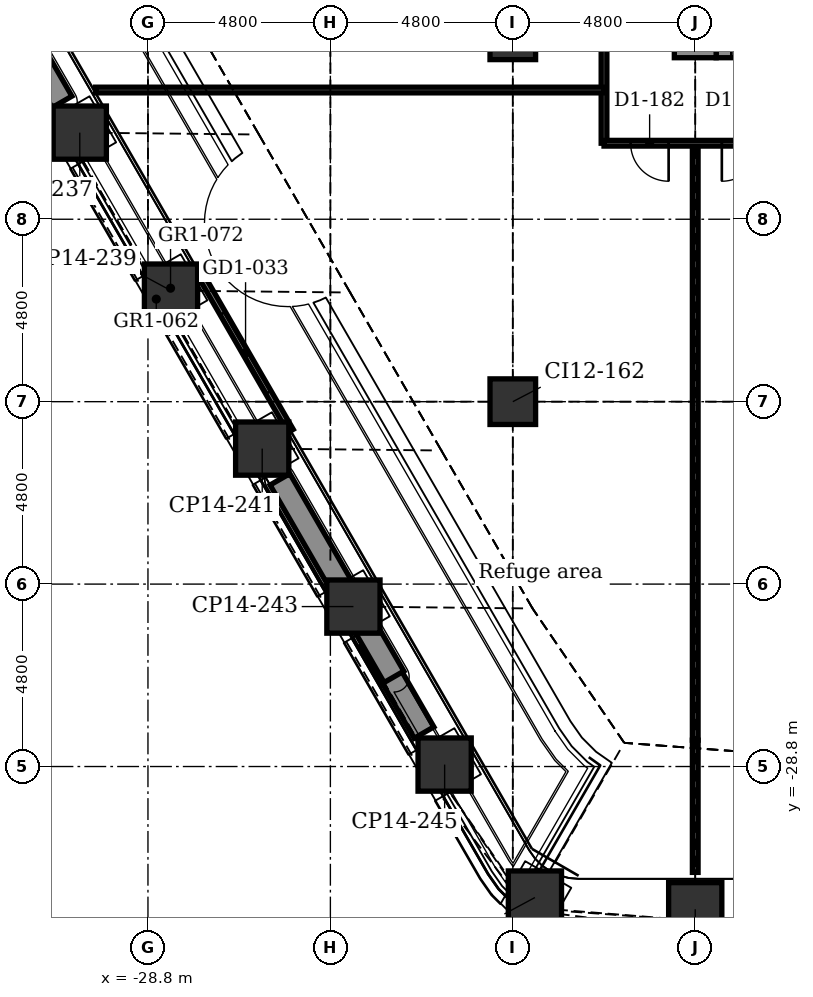
"""IFC4 building model, lengths in metres.
Left out: names, types, materials, properties, quantities, classifications, styles, units other than length and angle.
Written with IfcOpenShell. Run it as: python <this file> out.ifc"""

import sys

from ifc_helpers import new_model, si_unit, direction, frame, frame_2d, origin, origin_2d, place, context, subcontext, project, spatial, rectangle, extrude, element, fill, save


model = new_model("IFC4")
c1 = context("Model", 3, precision=1e-05, world=origin(), true_north=direction((0.0, 1.0)))
c2 = subcontext(c1, "Body", "Model", "MODEL_VIEW")
j1 = project(units=[si_unit("LENGTHUNIT", "METRE"), si_unit("PLANEANGLEUNIT", "RADIAN")], contexts=[c1])
p1 = place(None, origin())
s1 = spatial("IfcSite", under=j1, at=p1, CompositionType="ELEMENT")
p2 = place(p1, origin())
s2 = spatial("IfcBuilding", under=s1, at=p2, CompositionType="ELEMENT")
p3 = place(p2, frame((0.0, 0.0, 71.9)))
s3 = spatial("IfcBuildingStorey", under=s2, at=p3, CompositionType="ELEMENT", Elevation=71.9)
for number, where, z_axis, x_axis in (
    (1, (-14.4, -32.555, -0.3), (0.0, 0.0, 1.0), (1.0, 0.0, 0.0)),
    (2, (-18.618, -32.247, -0.3), (0.0, 0.0, 1.0), (0.5, 0.866, 0.0)),
    (3, (-20.994, -28.749, -0.3), (0.0, 0.0, 1.0), (0.866, 0.5, 0.0)),
    (4, (-23.394, -24.592, -0.3), (0.0, 0.0, 1.0), (0.866, 0.5, 0.0)),
    (5, (-25.794, -20.435, -0.3), (0.0, 0.0, 1.0), (0.866, 0.5, 0.0)),
    (6, (-28.194, -16.278, -0.3), (0.0, 0.0, 1.0), (0.866, 0.5, 0.0)),
    (7, (-30.594, -12.121, -0.3), (0.0, 0.0, 1.0), (0.866, 0.5, 0.0)),
):
    element("IfcColumn", number, at=place(p3, frame(where, z_axis=z_axis, x_axis=x_axis)), inside=s3, PredefinedType="COLUMN", context=c2, shape_type="SweptSolid", body=[
        extrude(rectangle(XDim=1.4, YDim=1.4, at=origin_2d()), origin(), (0.0, 0.0, 1.0), 6.1),
    ])
for number, where, z_axis, x_axis in (
    (8, (-19.2, -19.2, -0.3), (0.0, 0.0, 1.0), (1.0, 0.0, 0.0)),
    (9, (-19.2, -9.6, -0.3), (0.0, 0.0, 1.0), (1.0, 0.0, 0.0)),
):
    element("IfcColumn", number, at=place(p3, frame(where, z_axis=z_axis, x_axis=x_axis)), inside=s3, PredefinedType="COLUMN", context=c2, shape_type="SweptSolid", body=[
        extrude(rectangle(XDim=1.2, YDim=1.2, at=origin_2d()), origin(), (0.0, 0.0, 1.0), 6.1),
    ])
p4 = place(p3, frame((-13.85, -9.6, -0.3), z_axis=(0.0, 0.0, 1.0), x_axis=(1.0, 0.0, 0.0)))
e10 = element("IfcWall", 10, at=p4, inside=s3, PredefinedType="SHEAR", context=c2, shape_type="SweptSolid", body=[
    extrude(rectangle(XDim=3.7, YDim=1.1, at=frame_2d((1.85, 0.0))), origin(), (0.0, 0.0, 1.0), 6.1),
])
p5 = place(p4, frame((0.4, 0.0, 0.3)))
e11 = element("IfcOpeningElement", 11, at=p5, cuts=e10, PredefinedType="OPENING", context=c2, shape_type="SweptSolid", body=[
    extrude(rectangle(XDim=0.9, YDim=2.1, at=frame_2d((0.45, 1.05))), frame((0.0, 0.56, 0.0), z_axis=(0.0, -1.0, 0.0), x_axis=(1.0, 0.0, 0.0)), (0.0, 0.0, 1.0), 1.12),
])
p6 = place(p4, frame((2.75, 0.0, 0.3)))
e12 = element("IfcOpeningElement", 12, at=p6, cuts=e10, PredefinedType="OPENING", context=c2, shape_type="SweptSolid", body=[
    extrude(rectangle(XDim=0.9, YDim=2.1, at=frame_2d((0.45, 1.05))), frame((0.0, 0.56, 0.0), z_axis=(0.0, -1.0, 0.0), x_axis=(1.0, 0.0, 0.0)), (0.0, 0.0, 1.0), 1.12),
])
p7 = place(p3, frame((-14.4, -10.15, -0.3), z_axis=(0.0, 0.0, 1.0), x_axis=(0.0, 1.0, 0.0)))
e13 = element("IfcWall", 13, at=p7, inside=s3, PredefinedType="SHEAR", context=c2, shape_type="SweptSolid", body=[
    extrude(rectangle(XDim=20.3, YDim=1.1, at=frame_2d((10.15, 0.0))), origin(), (0.0, 0.0, 1.0), 6.1),
])
p8 = place(p7, frame((3.6, 0.0, 0.3)))
e14 = element("IfcOpeningElement", 14, at=p8, cuts=e13, PredefinedType="OPENING", context=c2, shape_type="SweptSolid", body=[
    extrude(rectangle(XDim=1.1, YDim=2.1, at=frame_2d((0.55, 1.05))), frame((0.0, 0.56, 0.0), z_axis=(0.0, -1.0, 0.0), x_axis=(1.0, 0.0, 0.0)), (0.0, 0.0, 1.0), 1.12),
])
p9 = place(p7, frame((6.0, 0.0, 0.3)))
e15 = element("IfcOpeningElement", 15, at=p9, cuts=e13, PredefinedType="OPENING", context=c2, shape_type="SweptSolid", body=[
    extrude(rectangle(XDim=1.1, YDim=2.1, at=frame_2d((0.55, 1.05))), frame((0.0, 0.56, 0.0), z_axis=(0.0, -1.0, 0.0), x_axis=(1.0, 0.0, 0.0)), (0.0, 0.0, 1.0), 1.12),
])
p10 = place(p7, frame((8.4, 0.0, 0.3)))
e16 = element("IfcOpeningElement", 16, at=p10, cuts=e13, PredefinedType="OPENING", context=c2, shape_type="SweptSolid", body=[
    extrude(rectangle(XDim=1.1, YDim=2.1, at=frame_2d((0.55, 1.05))), frame((0.0, 0.56, 0.0), z_axis=(0.0, -1.0, 0.0), x_axis=(1.0, 0.0, 0.0)), (0.0, 0.0, 1.0), 1.12),
])
p11 = place(p7, frame((10.8, 0.0, 0.3)))
e17 = element("IfcOpeningElement", 17, at=p11, cuts=e13, PredefinedType="OPENING", context=c2, shape_type="SweptSolid", body=[
    extrude(rectangle(XDim=1.1, YDim=2.1, at=frame_2d((0.55, 1.05))), frame((0.0, 0.56, 0.0), z_axis=(0.0, -1.0, 0.0), x_axis=(1.0, 0.0, 0.0)), (0.0, 0.0, 1.0), 1.12),
])
p12 = place(p3, frame((-25.047, -19.969, 0.0), z_axis=(0.0, 0.0, 1.0), x_axis=(-0.5000167099, 0.866015756104, 0.0)))
e18 = element("IfcWall", 18, at=p12, inside=s3, PredefinedType="PARTITIONING", context=c2, shape_type="SweptSolid", body=[
    extrude(rectangle(XDim=4.74, YDim=0.16, at=frame_2d((2.37, 0.0))), origin(), (0.0, 0.0, 1.0), 5.7),
])
p13 = place(p12, frame((1.17, 0.0, 0.0)))
e19 = element("IfcOpeningElement", 19, at=p13, cuts=e18, PredefinedType="OPENING", context=c2, shape_type="SweptSolid", body=[
    extrude(rectangle(XDim=2.4, YDim=2.4, at=frame_2d((1.2, 1.2))), frame((0.0, 0.09, 0.0), z_axis=(0.0, -1.0, 0.0), x_axis=(1.0, 0.0, 0.0)), (0.0, 0.0, 1.0), 0.18),
])
p14 = place(p3, frame((-21.537, -27.907, 0.0), z_axis=(0.0, 0.0, 1.0), x_axis=(-0.49998411664, 0.866034573852, 0.0)))
e20 = element("IfcWall", 20, at=p14, inside=s3, PredefinedType="USERDEFINED", context=c2, shape_type="SweptSolid", body=[
    extrude(rectangle(XDim=2.8, YDim=0.6, at=frame_2d((1.4, 0.0))), origin(), (0.0, 0.0, 1.0), 0.7),
])
for number, where, z_axis, x_axis in (
    (21, (-22.327, -26.44, 6.0), (0.0, 0.0, 1.0), (-0.5, 0.866, 0.0)),
    (22, (-31.061, -11.312, 6.0), (0.0, 0.0, 1.0), (-0.5, 0.866, 0.0)),
):
    element("IfcWall", number, at=place(p3, frame(where, z_axis=z_axis, x_axis=x_axis)), inside=s3, PredefinedType="USERDEFINED", context=c2, shape_type="SweptSolid", body=[
        extrude(rectangle(XDim=6.0, YDim=0.6, at=frame_2d((3.0, 0.0))), origin(), (0.0, 0.0, 1.0), 0.7),
    ])
p15 = place(p3, frame((-14.4, -28.107, 0.0), z_axis=(0.0, 0.0, 1.0), x_axis=(0.0, 1.0, 0.0)))
e23 = element("IfcWall", 23, at=p15, inside=s3, PredefinedType="PARTITIONING", context=c2, shape_type="SweptSolid", body=[
    extrude(rectangle(XDim=15.707, YDim=0.15, at=frame_2d((7.854, 0.0))), origin(), (0.0, 0.0, 1.0), 5.343),
])
p16 = place(p3, frame((-14.4, -31.585, 0.0), z_axis=(0.0, 0.0, 1.0), x_axis=(0.0, 1.0, 0.0)))
e24 = element("IfcWall", 24, at=p16, inside=s3, PredefinedType="PARTITIONING", context=c2, shape_type="SweptSolid", body=[
    extrude(rectangle(XDim=3.479, YDim=0.15, at=frame_2d((1.739, 0.0))), origin(), (0.0, 0.0, 1.0), 5.8),
])
p17 = place(p3, frame((-16.8, -12.4, 0.0), z_axis=(0.0, 0.0, 1.0), x_axis=(0.0, 1.0, 0.0)))
e25 = element("IfcWall", 25, at=p17, inside=s3, PredefinedType="PARTITIONING", context=c2, shape_type="SweptSolid", body=[
    extrude(rectangle(XDim=8.45, YDim=0.15, at=frame_2d((4.225, 0.0))), origin(), (0.0, 0.0, 1.0), 5.8),
])
p18 = place(p17, frame((5.2, 0.0, 0.0)))
e26 = element("IfcOpeningElement", 26, at=p18, cuts=e25, PredefinedType="OPENING", context=c2, shape_type="SweptSolid", body=[
    extrude(rectangle(XDim=1.0, YDim=2.1, at=frame_2d((0.5, 1.05))), frame((0.0, 0.085, 0.0), z_axis=(0.0, -1.0, 0.0), x_axis=(1.0, 0.0, 0.0)), (0.0, 0.0, 1.0), 0.17),
])
p19 = place(p3, frame((-16.8, -12.4, 0.0), z_axis=(0.0, 0.0, 1.0), x_axis=(1.0, 0.0, 0.0)))
e27 = element("IfcWall", 27, at=p19, inside=s3, PredefinedType="PARTITIONING", context=c2, shape_type="SweptSolid", body=[
    extrude(rectangle(XDim=38.4, YDim=0.15, at=frame_2d((19.2, 0.0))), origin(), (0.0, 0.0, 1.0), 5.8),
])
p20 = place(p19, frame((0.7, 0.0, 0.0)))
e28 = element("IfcOpeningElement", 28, at=p20, cuts=e27, PredefinedType="OPENING", context=c2, shape_type="SweptSolid", body=[
    extrude(rectangle(XDim=1.0, YDim=2.1, at=frame_2d((0.5, 1.05))), frame((0.0, 0.085, 0.0), z_axis=(0.0, -1.0, 0.0), x_axis=(1.0, 0.0, 0.0)), (0.0, 0.0, 1.0), 0.17),
])
p21 = place(p19, frame((3.1, 0.0, 0.0)))
e29 = element("IfcOpeningElement", 29, at=p21, cuts=e27, PredefinedType="OPENING", context=c2, shape_type="SweptSolid", body=[
    extrude(rectangle(XDim=1.0, YDim=2.1, at=frame_2d((0.5, 1.05))), frame((0.0, 0.085, 0.0), z_axis=(0.0, -1.0, 0.0), x_axis=(1.0, 0.0, 0.0)), (0.0, 0.0, 1.0), 0.17),
])
p22 = place(p19, frame((5.5, 0.0, 0.0)))
e30 = element("IfcOpeningElement", 30, at=p22, cuts=e27, PredefinedType="OPENING", context=c2, shape_type="SweptSolid", body=[
    extrude(rectangle(XDim=1.0, YDim=2.1, at=frame_2d((0.5, 1.05))), frame((0.0, 0.085, 0.0), z_axis=(0.0, -1.0, 0.0), x_axis=(1.0, 0.0, 0.0)), (0.0, 0.0, 1.0), 0.17),
])
p23 = place(p19, frame((11.095, 0.0, 0.0)))
e31 = element("IfcOpeningElement", 31, at=p23, cuts=e27, PredefinedType="OPENING", context=c2, shape_type="SweptSolid", body=[
    extrude(rectangle(XDim=1.0, YDim=2.1, at=frame_2d((0.5, 1.05))), frame((0.0, 0.085, 0.0), z_axis=(0.0, -1.0, 0.0), x_axis=(1.0, 0.0, 0.0)), (0.0, 0.0, 1.0), 0.17),
])
p24 = place(p19, frame((15.275, 0.0, 0.0)))
e32 = element("IfcOpeningElement", 32, at=p24, cuts=e27, PredefinedType="OPENING", context=c2, shape_type="SweptSolid", body=[
    extrude(rectangle(XDim=1.0, YDim=2.1, at=frame_2d((0.5, 1.05))), frame((0.0, 0.085, 0.0), z_axis=(0.0, -1.0, 0.0), x_axis=(1.0, 0.0, 0.0)), (0.0, 0.0, 1.0), 0.17),
])
p25 = place(p19, frame((23.5, 0.0, 0.0)))
e33 = element("IfcOpeningElement", 33, at=p25, cuts=e27, PredefinedType="OPENING", context=c2, shape_type="SweptSolid", body=[
    extrude(rectangle(XDim=1.0, YDim=2.1, at=frame_2d((0.5, 1.05))), frame((0.0, 0.085, 0.0), z_axis=(0.0, -1.0, 0.0), x_axis=(1.0, 0.0, 0.0)), (0.0, 0.0, 1.0), 0.17),
])
p26 = place(p19, frame((27.1, 0.0, 0.0)))
e34 = element("IfcOpeningElement", 34, at=p26, cuts=e27, PredefinedType="OPENING", context=c2, shape_type="SweptSolid", body=[
    extrude(rectangle(XDim=1.0, YDim=2.1, at=frame_2d((0.5, 1.05))), frame((0.0, 0.085, 0.0), z_axis=(0.0, -1.0, 0.0), x_axis=(1.0, 0.0, 0.0)), (0.0, 0.0, 1.0), 0.17),
])
p27 = place(p19, frame((29.5, 0.0, 0.0)))
e35 = element("IfcOpeningElement", 35, at=p27, cuts=e27, PredefinedType="OPENING", context=c2, shape_type="SweptSolid", body=[
    extrude(rectangle(XDim=1.0, YDim=2.1, at=frame_2d((0.5, 1.05))), frame((0.0, 0.085, 0.0), z_axis=(0.0, -1.0, 0.0), x_axis=(1.0, 0.0, 0.0)), (0.0, 0.0, 1.0), 0.17),
])
p28 = place(p19, frame((31.9, 0.0, 0.0)))
e36 = element("IfcOpeningElement", 36, at=p28, cuts=e27, PredefinedType="OPENING", context=c2, shape_type="SweptSolid", body=[
    extrude(rectangle(XDim=1.0, YDim=2.1, at=frame_2d((0.5, 1.05))), frame((0.0, 0.085, 0.0), z_axis=(0.0, -1.0, 0.0), x_axis=(1.0, 0.0, 0.0)), (0.0, 0.0, 1.0), 0.17),
])
p29 = place(p3, frame((-30.178, -11.0, 0.0), z_axis=(0.0, 0.0, 1.0), x_axis=(1.0, 0.0, 0.0)))
e37 = element("IfcWall", 37, at=p29, inside=s3, PredefinedType="PARTITIONING", context=c2, shape_type="SweptSolid", body=[
    extrude(rectangle(XDim=13.378, YDim=0.15, at=frame_2d((6.689, 0.0))), origin(), (0.0, 0.0, 1.0), 5.7),
])
p30 = place(p13, origin())
e38 = element("IfcDoor", 38, at=p30, inside=s3, OperationType="DOUBLE_DOOR_SLIDING", PredefinedType="DOOR", context=c2, shape_type="SweptSolid", body=[
    extrude(rectangle(XDim=2.4, YDim=2.4, at=frame_2d((1.2, 1.2))), frame((0.0, 0.025, 0.0), z_axis=(0.0, -1.0, 0.0), x_axis=(1.0, 0.0, 0.0)), (0.0, 0.0, 1.0), 0.05),
])
fill(e19, e38)
p31 = place(p20, frame((1.0, 0.0, 0.0), z_axis=(0.0, 0.0, 1.0), x_axis=(-1.0, 0.0, 0.0)))
e39 = element("IfcDoor", 39, at=p31, inside=s3, OperationType="SINGLE_SWING_RIGHT", PredefinedType="DOOR", context=c2, shape_type="SweptSolid", body=[
    extrude(rectangle(XDim=1.0, YDim=2.1, at=frame_2d((0.5, 1.05))), frame((0.0, 0.025, 0.0), z_axis=(0.0, -1.0, 0.0), x_axis=(1.0, 0.0, 0.0)), (0.0, 0.0, 1.0), 0.05),
])
fill(e28, e39)
p32 = place(p21, frame((1.0, 0.0, 0.0), z_axis=(0.0, 0.0, 1.0), x_axis=(-1.0, 0.0, 0.0)))
e40 = element("IfcDoor", 40, at=p32, inside=s3, OperationType="SINGLE_SWING_LEFT", PredefinedType="DOOR", context=c2, shape_type="SweptSolid", body=[
    extrude(rectangle(XDim=1.0, YDim=2.1, at=frame_2d((0.5, 1.05))), frame((0.0, 0.025, 0.0), z_axis=(0.0, -1.0, 0.0), x_axis=(1.0, 0.0, 0.0)), (0.0, 0.0, 1.0), 0.05),
])
fill(e29, e40)
save(model, sys.argv[1])
